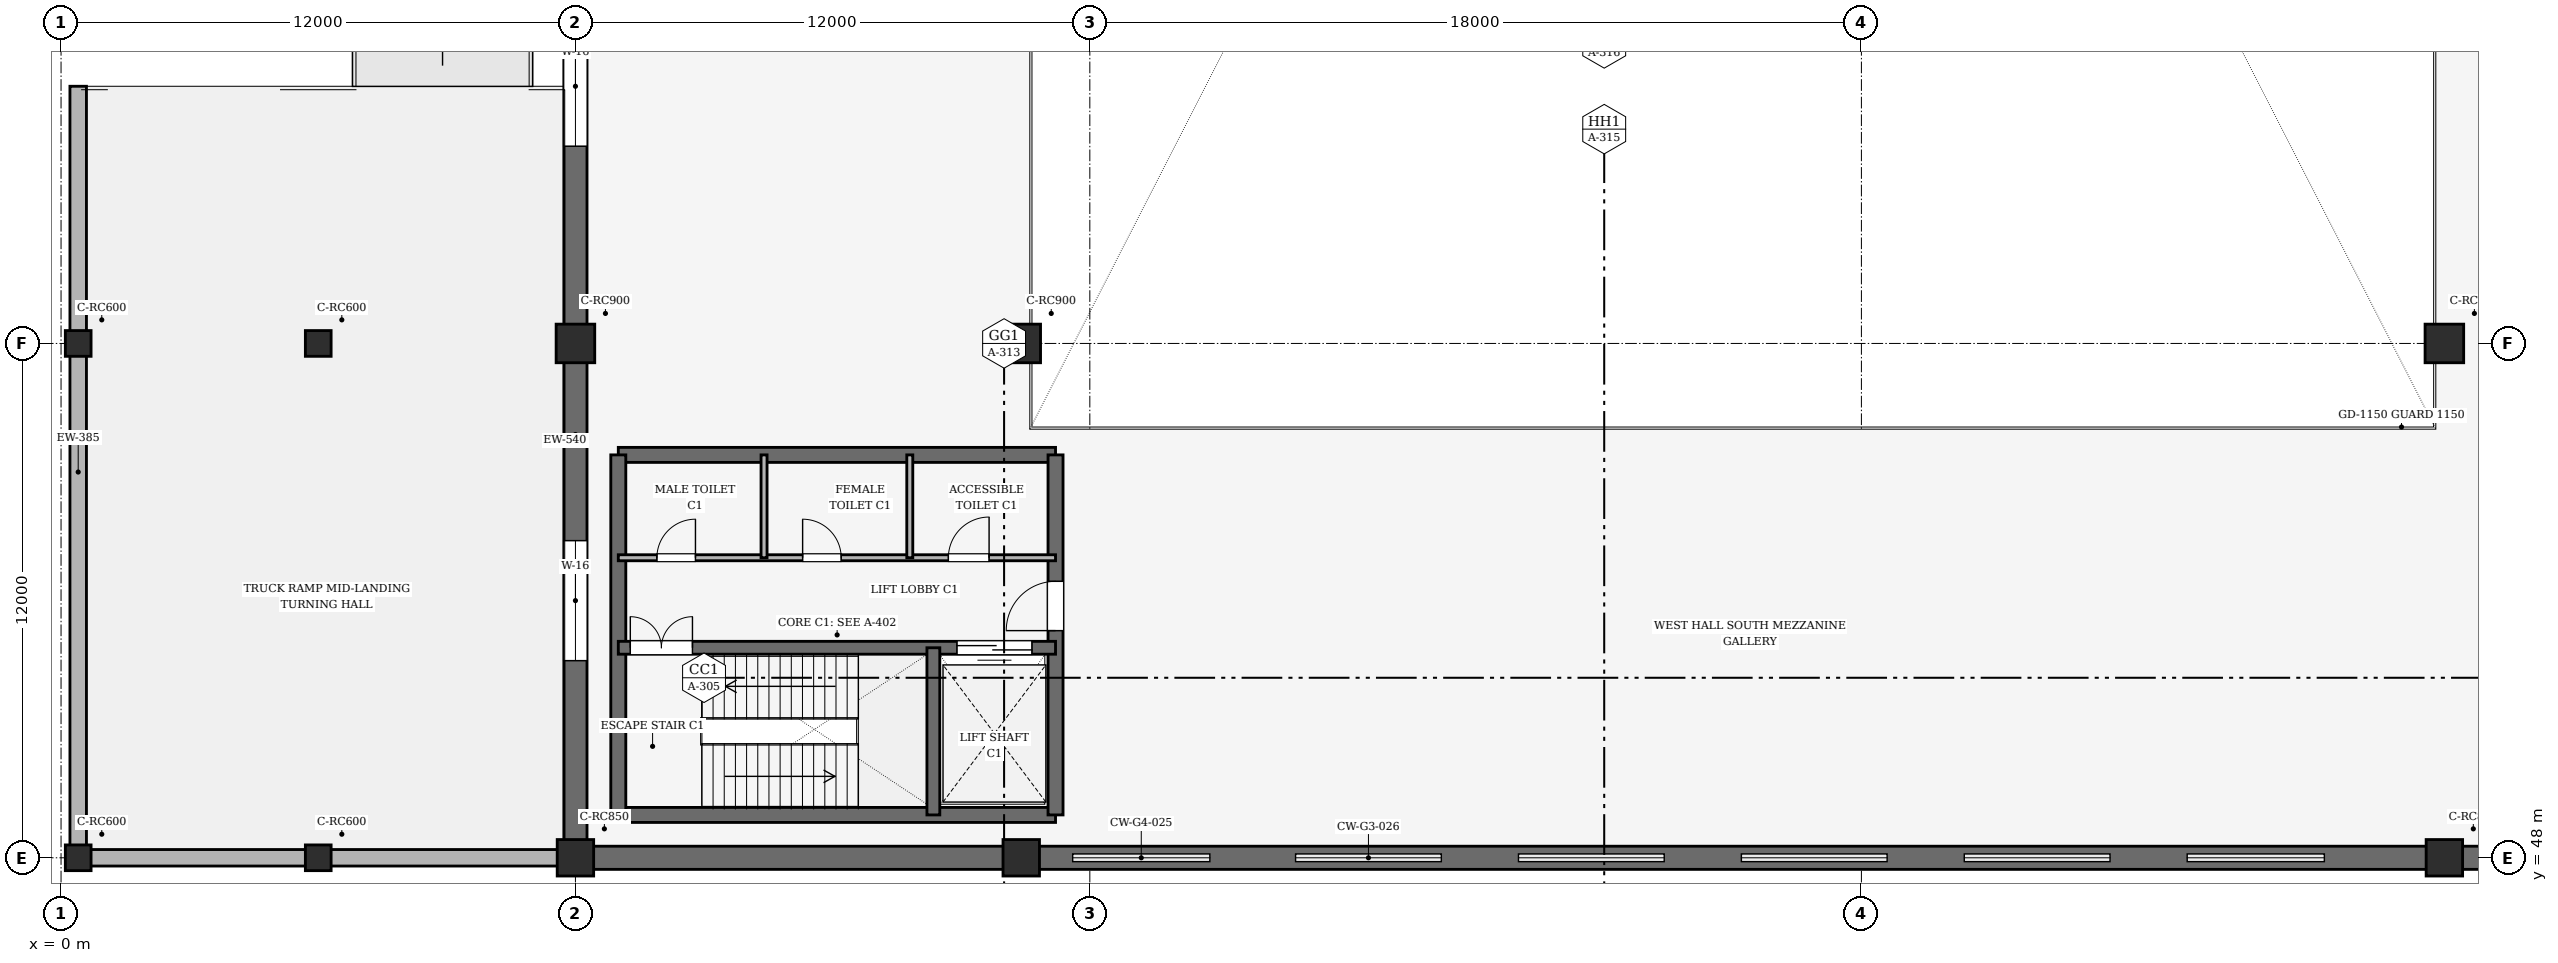
"""IFC4 building model, lengths in metres.
Left out: names, types, materials, properties, quantities, classifications, styles, units other than length and angle.
Written with IfcOpenShell. Run it as: python <this file> out.ifc"""

import sys

from ifc_helpers import new_model, si_unit, direction, frame, frame_2d, origin, origin_2d, place, context, subcontext, project, spatial, rectangle, extrude, element, fill, save


model = new_model("IFC4")
c1 = context("Model", 3, precision=1e-05, world=origin(), true_north=direction((0.0, 1.0)))
c2 = subcontext(c1, "Body", "Model", "MODEL_VIEW")
j1 = project(units=[si_unit("LENGTHUNIT", "METRE"), si_unit("PLANEANGLEUNIT", "RADIAN")], contexts=[c1])
p1 = place(None, origin())
s1 = spatial("IfcSite", under=j1, at=p1, CompositionType="ELEMENT")
p2 = place(p1, origin())
s2 = spatial("IfcBuilding", under=s1, at=p2, CompositionType="ELEMENT")
p3 = place(p2, frame((0.0, 0.0, 5.4)))
s3 = spatial("IfcBuildingStorey", under=s2, at=p3, CompositionType="ELEMENT", Elevation=5.4)
for number, where, z_axis, x_axis in (
    (1, (12.0, 48.0, 0.0), (0.0, 0.0, 1.0), (1.0, 0.0, 0.0)),
    (2, (22.4, 48.0, 0.0), (0.0, 0.0, 1.0), (1.0, 0.0, 0.0)),
    (3, (55.6, 48.0, 0.0), (0.0, 0.0, 1.0), (1.0, 0.0, 0.0)),
):
    element("IfcColumn", number, at=place(p3, frame(where, z_axis=z_axis, x_axis=x_axis)), inside=s3, PredefinedType="COLUMN", context=c2, shape_type="SweptSolid", body=[
        extrude(rectangle(XDim=0.85, YDim=0.85, at=origin_2d()), origin(), (0.0, 0.0, 1.0), 5.4),
    ])
for number, where, z_axis, x_axis in (
    (4, (12.0, 60.0, 0.0), (0.0, 0.0, 1.0), (1.0, 0.0, 0.0)),
    (5, (22.4, 60.0, 0.0), (0.0, 0.0, 1.0), (1.0, 0.0, 0.0)),
    (6, (55.6, 60.0, 0.0), (0.0, 0.0, 1.0), (1.0, 0.0, 0.0)),
):
    element("IfcColumn", number, at=place(p3, frame(where, z_axis=z_axis, x_axis=x_axis)), inside=s3, PredefinedType="COLUMN", context=c2, shape_type="SweptSolid", body=[
        extrude(rectangle(XDim=0.9, YDim=0.9, at=origin_2d()), origin(), (0.0, 0.0, 1.0), 5.4),
    ])
for number, where, z_axis, x_axis in (
    (7, (0.4, 48.0, 0.0), (0.0, 0.0, 1.0), (1.0, 0.0, 0.0)),
    (8, (6.0, 48.0, 0.0), (0.0, 0.0, 1.0), (1.0, 0.0, 0.0)),
    (9, (0.4, 60.0, 0.0), (0.0, 0.0, 1.0), (1.0, 0.0, 0.0)),
    (10, (6.0, 60.0, 0.0), (0.0, 0.0, 1.0), (1.0, 0.0, 0.0)),
):
    element("IfcColumn", number, at=place(p3, frame(where, z_axis=z_axis, x_axis=x_axis)), inside=s3, PredefinedType="COLUMN", context=c2, shape_type="SweptSolid", body=[
        extrude(rectangle(XDim=0.6, YDim=0.6, at=origin_2d()), origin(), (0.0, 0.0, 1.0), 5.4),
    ])
p4 = place(p3, frame((12.0, 60.0, 0.0), z_axis=(0.0, 0.0, 1.0), x_axis=(0.0, -1.0, 0.0)))
e11 = element("IfcWall", 11, at=p4, inside=s3, PredefinedType="SOLIDWALL", context=c2, shape_type="SweptSolid", body=[
    extrude(rectangle(XDim=12.0, YDim=0.54, at=frame_2d((6.0, 0.0))), origin(), (0.0, 0.0, 1.0), 4.0),
])
p5 = place(p4, frame((4.6, 0.0, 1.3)))
e12 = element("IfcOpeningElement", 12, at=p5, cuts=e11, PredefinedType="OPENING", context=c2, shape_type="SweptSolid", body=[
    extrude(rectangle(XDim=2.8, YDim=1.35, at=frame_2d((1.4, 0.675))), frame((0.0, 0.28, 0.0), z_axis=(0.0, -1.0, 0.0), x_axis=(1.0, 0.0, 0.0)), (0.0, 0.0, 1.0), 0.56),
])
p6 = place(p3, frame((12.0, 72.0, 0.0), z_axis=(0.0, 0.0, 1.0), x_axis=(0.0, -1.0, 0.0)))
e13 = element("IfcWall", 13, at=p6, inside=s3, PredefinedType="SOLIDWALL", context=c2, shape_type="SweptSolid", body=[
    extrude(rectangle(XDim=12.0, YDim=0.54, at=frame_2d((6.0, 0.0))), origin(), (0.0, 0.0, 1.0), 4.0),
])
p7 = place(p6, frame((4.6, 0.0, 1.3)))
e14 = element("IfcOpeningElement", 14, at=p7, cuts=e13, PredefinedType="OPENING", context=c2, shape_type="SweptSolid", body=[
    extrude(rectangle(XDim=2.8, YDim=1.35, at=frame_2d((1.4, 0.675))), frame((0.0, 0.28, 0.0), z_axis=(0.0, -1.0, 0.0), x_axis=(1.0, 0.0, 0.0)), (0.0, 0.0, 1.0), 0.56),
])
p8 = place(p3, frame((12.0, 48.0, 0.0), z_axis=(0.0, 0.0, 1.0), x_axis=(1.0, 0.0, 0.0)))
e15 = element("IfcWall", 15, at=p8, inside=s3, PredefinedType="SOLIDWALL", context=c2, shape_type="SweptSolid", body=[
    extrude(rectangle(XDim=10.4, YDim=0.54, at=frame_2d((5.2, 0.0))), origin(), (0.0, 0.0, 1.0), 4.0),
])
p9 = place(p3, frame((22.4, 48.0, 0.0), z_axis=(0.0, 0.0, 1.0), x_axis=(1.0, 0.0, 0.0)))
e16 = element("IfcWall", 16, at=p9, inside=s3, PredefinedType="SOLIDWALL", context=c2, shape_type="SweptSolid", body=[
    extrude(rectangle(XDim=33.2, YDim=0.54, at=frame_2d((16.6, 0.0))), origin(), (0.0, 0.0, 1.0), 0.5),
])
p10 = place(p3, frame((55.6, 48.0, 0.0), z_axis=(0.0, 0.0, 1.0), x_axis=(1.0, 0.0, 0.0)))
e17 = element("IfcWall", 17, at=p10, inside=s3, PredefinedType="SOLIDWALL", context=c2, shape_type="SweptSolid", body=[
    extrude(rectangle(XDim=10.4, YDim=0.54, at=frame_2d((5.2, 0.0))), origin(), (0.0, 0.0, 1.0), 4.0),
])
p11 = place(p3, frame((0.4, 66.0, 0.0), z_axis=(0.0, 0.0, 1.0), x_axis=(0.0, -1.0, 0.0)))
e18 = element("IfcWall", 18, at=p11, inside=s3, PredefinedType="SOLIDWALL", context=c2, shape_type="SweptSolid", body=[
    extrude(rectangle(XDim=18.0, YDim=0.385, at=frame_2d((9.0, 0.0))), origin(), (0.0, 0.0, 1.0), 4.15),
])
p12 = place(p3, frame((0.4, 48.0, 0.0), z_axis=(0.0, 0.0, 1.0), x_axis=(1.0, 0.0, 0.0)))
e19 = element("IfcWall", 19, at=p12, inside=s3, PredefinedType="SOLIDWALL", context=c2, shape_type="SweptSolid", body=[
    extrude(rectangle(XDim=11.6, YDim=0.385, at=frame_2d((5.8, 0.0))), origin(), (0.0, 0.0, 1.0), 3.935),
])
for number, where, z_axis, x_axis in (
    (20, (13.0, 49.0, 0.0), (0.0, 0.0, 1.0), (1.0, 0.0, 0.0)),
    (21, (23.2, 57.4, 0.0), (0.0, 0.0, 1.0), (-1.0, 0.0, 0.0)),
):
    element("IfcWall", number, at=place(p3, frame(where, z_axis=z_axis, x_axis=x_axis)), inside=s3, PredefinedType="SHEAR", context=c2, shape_type="SweptSolid", body=[
        extrude(rectangle(XDim=10.2, YDim=0.35, at=frame_2d((5.1, 0.0))), origin(), (0.0, 0.0, 1.0), 5.4),
    ])
p13 = place(p3, frame((13.0, 57.4, 0.0), z_axis=(0.0, 0.0, 1.0), x_axis=(0.0, -1.0, 0.0)))
e22 = element("IfcWall", 22, at=p13, inside=s3, PredefinedType="SHEAR", context=c2, shape_type="SweptSolid", body=[
    extrude(rectangle(XDim=8.4, YDim=0.35, at=frame_2d((4.2, 0.0))), origin(), (0.0, 0.0, 1.0), 5.4),
])
p14 = place(p3, frame((23.2, 49.0, 0.0), z_axis=(0.0, 0.0, 1.0), x_axis=(0.0, 1.0, 0.0)))
e23 = element("IfcWall", 23, at=p14, inside=s3, PredefinedType="SHEAR", context=c2, shape_type="SweptSolid", body=[
    extrude(rectangle(XDim=8.4, YDim=0.35, at=frame_2d((4.2, 0.0))), origin(), (0.0, 0.0, 1.0), 5.4),
])
p15 = place(p14, frame((4.3, 0.0, 0.0)))
e24 = element("IfcOpeningElement", 24, at=p15, cuts=e23, PredefinedType="OPENING", context=c2, shape_type="SweptSolid", body=[
    extrude(rectangle(XDim=1.15, YDim=2.15, at=frame_2d((0.575, 1.075))), frame((0.0, 0.185, 0.0), z_axis=(0.0, -1.0, 0.0), x_axis=(1.0, 0.0, 0.0)), (0.0, 0.0, 1.0), 0.37),
])
p16 = place(p3, frame((13.0, 52.9, 0.0), z_axis=(0.0, 0.0, 1.0), x_axis=(1.0, 0.0, 0.0)))
e25 = element("IfcWall", 25, at=p16, inside=s3, PredefinedType="SHEAR", context=c2, shape_type="SweptSolid", body=[
    extrude(rectangle(XDim=10.2, YDim=0.3, at=frame_2d((5.1, 0.0))), origin(), (0.0, 0.0, 1.0), 5.4),
])
p17 = place(p16, frame((0.28, 0.0, 0.0)))
e26 = element("IfcOpeningElement", 26, at=p17, cuts=e25, PredefinedType="OPENING", context=c2, shape_type="SweptSolid", body=[
    extrude(rectangle(XDim=1.45, YDim=2.15, at=frame_2d((0.725, 1.075))), frame((0.0, 0.16, 0.0), z_axis=(0.0, -1.0, 0.0), x_axis=(1.0, 0.0, 0.0)), (0.0, 0.0, 1.0), 0.32),
])
p18 = place(p16, frame((7.9, 0.0, 0.0)))
e27 = element("IfcOpeningElement", 27, at=p18, cuts=e25, PredefinedType="OPENING", context=c2, shape_type="SweptSolid", body=[
    extrude(rectangle(XDim=1.75, YDim=2.3, at=frame_2d((0.875, 1.15))), frame((0.0, 0.16, 0.0), z_axis=(0.0, -1.0, 0.0), x_axis=(1.0, 0.0, 0.0)), (0.0, 0.0, 1.0), 0.32),
])
p19 = place(p3, frame((20.35, 49.0, 0.0), z_axis=(0.0, 0.0, 1.0), x_axis=(0.0, 1.0, 0.0)))
e28 = element("IfcWall", 28, at=p19, inside=s3, PredefinedType="SHEAR", context=c2, shape_type="SweptSolid", body=[
    extrude(rectangle(XDim=3.9, YDim=0.3, at=frame_2d((1.95, 0.0))), origin(), (0.0, 0.0, 1.0), 5.4),
])
p20 = place(p3, frame((13.0, 55.0, 0.0), z_axis=(0.0, 0.0, 1.0), x_axis=(1.0, 0.0, 0.0)))
e29 = element("IfcWall", 29, at=p20, inside=s3, PredefinedType="PARTITIONING", context=c2, shape_type="SweptSolid", body=[
    extrude(rectangle(XDim=10.2, YDim=0.14, at=frame_2d((5.1, 0.0))), origin(), (0.0, 0.0, 1.0), 4.035),
])
p21 = place(p20, frame((0.9, 0.0, 0.0)))
e30 = element("IfcOpeningElement", 30, at=p21, cuts=e29, PredefinedType="OPENING", context=c2, shape_type="SweptSolid", body=[
    extrude(rectangle(XDim=0.9, YDim=2.1, at=frame_2d((0.45, 1.05))), frame((0.0, 0.08, 0.0), z_axis=(0.0, -1.0, 0.0), x_axis=(1.0, 0.0, 0.0)), (0.0, 0.0, 1.0), 0.16),
])
p22 = place(p20, frame((4.3, 0.0, 0.0)))
e31 = element("IfcOpeningElement", 31, at=p22, cuts=e29, PredefinedType="OPENING", context=c2, shape_type="SweptSolid", body=[
    extrude(rectangle(XDim=0.9, YDim=2.1, at=frame_2d((0.45, 1.05))), frame((0.0, 0.08, 0.0), z_axis=(0.0, -1.0, 0.0), x_axis=(1.0, 0.0, 0.0)), (0.0, 0.0, 1.0), 0.16),
])
p23 = place(p20, frame((7.7, 0.0, 0.0)))
e32 = element("IfcOpeningElement", 32, at=p23, cuts=e29, PredefinedType="OPENING", context=c2, shape_type="SweptSolid", body=[
    extrude(rectangle(XDim=0.95, YDim=2.1, at=frame_2d((0.475, 1.05))), frame((0.0, 0.08, 0.0), z_axis=(0.0, -1.0, 0.0), x_axis=(1.0, 0.0, 0.0)), (0.0, 0.0, 1.0), 0.16),
])
for number, where, z_axis, x_axis in (
    (33, (16.4, 55.0, 0.0), (0.0, 0.0, 1.0), (0.0, 1.0, 0.0)),
    (34, (19.8, 55.0, 0.0), (0.0, 0.0, 1.0), (0.0, 1.0, 0.0)),
):
    element("IfcWall", number, at=place(p3, frame(where, z_axis=z_axis, x_axis=x_axis)), inside=s3, PredefinedType="PARTITIONING", context=c2, shape_type="SweptSolid", body=[
        extrude(rectangle(XDim=2.4, YDim=0.14, at=frame_2d((1.2, 0.0))), origin(), (0.0, 0.0, 1.0), 4.5),
    ])
p24 = place(p5, origin())
e35 = element("IfcWindow", 35, at=p24, inside=s3, PartitioningType="TRIPLE_PANEL_HORIZONTAL", PredefinedType="WINDOW", context=c2, shape_type="SweptSolid", body=[
    extrude(rectangle(XDim=2.8, YDim=1.35, at=frame_2d((1.4, 0.675))), frame((0.0, 0.03, 0.0), z_axis=(0.0, -1.0, 0.0), x_axis=(1.0, 0.0, 0.0)), (0.0, 0.0, 1.0), 0.06),
])
fill(e12, e35)
p25 = place(p7, origin())
e36 = element("IfcWindow", 36, at=p25, inside=s3, PartitioningType="TRIPLE_PANEL_HORIZONTAL", PredefinedType="WINDOW", context=c2, shape_type="SweptSolid", body=[
    extrude(rectangle(XDim=2.8, YDim=1.35, at=frame_2d((1.4, 0.675))), frame((0.0, 0.03, 0.0), z_axis=(0.0, -1.0, 0.0), x_axis=(1.0, 0.0, 0.0)), (0.0, 0.0, 1.0), 0.06),
])
fill(e14, e36)
p26 = place(p15, origin())
e37 = element("IfcDoor", 37, at=p26, inside=s3, OperationType="SINGLE_SWING_LEFT", PredefinedType="DOOR", context=c2, shape_type="SweptSolid", body=[
    extrude(rectangle(XDim=1.15, YDim=2.15, at=frame_2d((0.575, 1.075))), frame((0.0, 0.025, 0.0), z_axis=(0.0, -1.0, 0.0), x_axis=(1.0, 0.0, 0.0)), (0.0, 0.0, 1.0), 0.05),
])
fill(e24, e37)
p27 = place(p17, origin())
e38 = element("IfcDoor", 38, at=p27, inside=s3, OperationType="DOUBLE_DOOR_SINGLE_SWING", PredefinedType="DOOR", context=c2, shape_type="SweptSolid", body=[
    extrude(rectangle(XDim=1.45, YDim=2.15, at=frame_2d((0.725, 1.075))), frame((0.0, 0.025, 0.0), z_axis=(0.0, -1.0, 0.0), x_axis=(1.0, 0.0, 0.0)), (0.0, 0.0, 1.0), 0.05),
])
fill(e26, e38)
p28 = place(p18, origin())
e39 = element("IfcDoor", 39, at=p28, inside=s3, OperationType="DOUBLE_DOOR_SLIDING", PredefinedType="DOOR", context=c2, shape_type="SweptSolid", body=[
    extrude(rectangle(XDim=1.75, YDim=2.3, at=frame_2d((0.875, 1.15))), frame((0.0, 0.025, 0.0), z_axis=(0.0, -1.0, 0.0), x_axis=(1.0, 0.0, 0.0)), (0.0, 0.0, 1.0), 0.05),
])
fill(e27, e39)
p29 = place(p21, origin())
e40 = element("IfcDoor", 40, at=p29, inside=s3, OperationType="SINGLE_SWING_RIGHT", PredefinedType="DOOR", context=c2, shape_type="SweptSolid", body=[
    extrude(rectangle(XDim=0.9, YDim=2.1, at=frame_2d((0.45, 1.05))), frame((0.0, 0.025, 0.0), z_axis=(0.0, -1.0, 0.0), x_axis=(1.0, 0.0, 0.0)), (0.0, 0.0, 1.0), 0.05),
])
fill(e30, e40)
p30 = place(p22, origin())
e41 = element("IfcDoor", 41, at=p30, inside=s3, OperationType="SINGLE_SWING_LEFT", PredefinedType="DOOR", context=c2, shape_type="SweptSolid", body=[
    extrude(rectangle(XDim=0.9, YDim=2.1, at=frame_2d((0.45, 1.05))), frame((0.0, 0.025, 0.0), z_axis=(0.0, -1.0, 0.0), x_axis=(1.0, 0.0, 0.0)), (0.0, 0.0, 1.0), 0.05),
])
fill(e31, e41)
p31 = place(p23, origin())
e42 = element("IfcDoor", 42, at=p31, inside=s3, OperationType="SINGLE_SWING_RIGHT", PredefinedType="DOOR", context=c2, shape_type="SweptSolid", body=[
    extrude(rectangle(XDim=0.95, YDim=2.1, at=frame_2d((0.475, 1.05))), frame((0.0, 0.025, 0.0), z_axis=(0.0, -1.0, 0.0), x_axis=(1.0, 0.0, 0.0)), (0.0, 0.0, 1.0), 0.05),
])
fill(e32, e42)
save(model, sys.argv[1])
